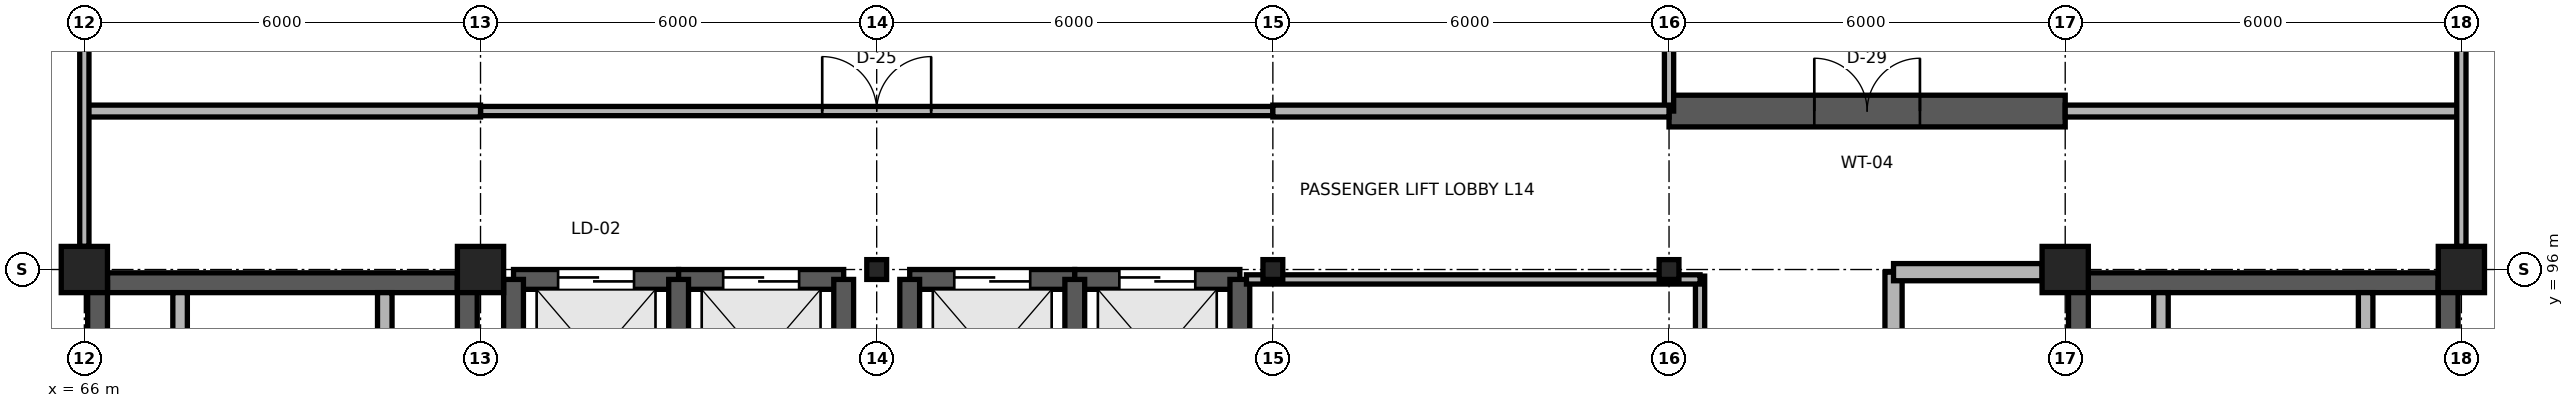
"""IFC4 building model, lengths in metres.
Left out: names, types, materials, properties, quantities, classifications, styles, units other than length and angle.
Written with IfcOpenShell. Run it as: python <this file> out.ifc"""

import sys

from ifc_helpers import new_model, si_unit, direction, frame, frame_2d, origin, origin_2d, place, context, subcontext, project, spatial, rectangle, i_section, extrude, element, fill, save


model = new_model("IFC4")
c1 = context("Model", 3, precision=1e-05, world=origin(), true_north=direction((0.0, 1.0)))
c2 = subcontext(c1, "Body", "Model", "MODEL_VIEW")
j1 = project(units=[si_unit("LENGTHUNIT", "METRE"), si_unit("PLANEANGLEUNIT", "RADIAN")], contexts=[c1])
p1 = place(None, origin())
s1 = spatial("IfcSite", under=j1, at=p1, CompositionType="ELEMENT")
p2 = place(p1, origin())
s2 = spatial("IfcBuilding", under=s1, at=p2, CompositionType="ELEMENT")
p3 = place(p2, frame((0.0, 0.0, 56.1)))
s3 = spatial("IfcBuildingStorey", under=s2, at=p3, CompositionType="ELEMENT", Elevation=56.1)
for number, where, z_axis, x_axis in (
    (1, (66.0, 96.0, 0.0), (0.0, 0.0, 1.0), (1.0, 0.0, 0.0)),
    (2, (72.0, 96.0, 0.0), (0.0, 0.0, 1.0), (1.0, 0.0, 0.0)),
):
    element("IfcColumn", number, at=place(p3, frame(where, z_axis=z_axis, x_axis=x_axis)), inside=s3, PredefinedType="COLUMN", context=c2, shape_type="SweptSolid", body=[
        extrude(rectangle(XDim=0.7, YDim=0.7, at=origin_2d()), origin(), (0.0, 0.0, 1.0), 3.9),
    ])
for number, where, z_axis, x_axis in (
    (3, (78.0, 96.0, 0.0), (0.0, 0.0, 1.0), (1.0, 0.0, 0.0)),
    (4, (84.0, 96.0, 0.0), (0.0, 0.0, 1.0), (1.0, 0.0, 0.0)),
    (5, (90.0, 96.0, 0.0), (0.0, 0.0, 1.0), (1.0, 0.0, 0.0)),
):
    element("IfcColumn", number, at=place(p3, frame(where, z_axis=z_axis, x_axis=x_axis)), inside=s3, PredefinedType="COLUMN", context=c2, shape_type="SweptSolid", body=[
        extrude(i_section(OverallWidth=0.3, OverallDepth=0.3, WebThickness=0.01, FlangeThickness=0.015, FilletRadius=0.018, at=origin_2d()), origin(), (0.0, 0.0, 1.0), 3.9),
    ])
for number, where, z_axis, x_axis in (
    (6, (96.0, 96.0, 0.0), (0.0, 0.0, 1.0), (1.0, 0.0, 0.0)),
    (7, (102.0, 96.0, 0.0), (0.0, 0.0, 1.0), (1.0, 0.0, 0.0)),
):
    element("IfcColumn", number, at=place(p3, frame(where, z_axis=z_axis, x_axis=x_axis)), inside=s3, PredefinedType="COLUMN", context=c2, shape_type="SweptSolid", body=[
        extrude(rectangle(XDim=0.7, YDim=0.7, at=origin_2d()), origin(), (0.0, 0.0, 1.0), 3.9),
    ])
p4 = place(p3, frame((66.35, 95.8, 0.0), z_axis=(0.0, 0.0, 1.0), x_axis=(1.0, 0.0, 0.0)))
e8 = element("IfcWall", 8, at=p4, inside=s3, PredefinedType="SHEAR", context=c2, shape_type="SweptSolid", body=[
    extrude(rectangle(XDim=5.3, YDim=0.3, at=frame_2d((2.65, 0.0))), origin(), (0.0, 0.0, 1.0), 3.74),
])
for number, where, z_axis, x_axis in (
    (9, (66.2, 84.0, 0.0), (0.0, 0.0, 1.0), (0.0, 1.0, 0.0)),
    (10, (71.8, 84.0, 0.0), (0.0, 0.0, 1.0), (0.0, 1.0, 0.0)),
):
    element("IfcWall", number, at=place(p3, frame(where, z_axis=z_axis, x_axis=x_axis)), inside=s3, PredefinedType="SHEAR", context=c2, shape_type="SweptSolid", body=[
        extrude(rectangle(XDim=11.8, YDim=0.3, at=frame_2d((5.9, 0.0))), origin(), (0.0, 0.0, 1.0), 3.74),
    ])
for number, where, z_axis, x_axis in (
    (11, (67.45, 94.4, 0.0), (0.0, 0.0, 1.0), (0.0, 1.0, 0.0)),
    (12, (70.55, 94.4, 0.0), (0.0, 0.0, 1.0), (0.0, 1.0, 0.0)),
):
    element("IfcWall", number, at=place(p3, frame(where, z_axis=z_axis, x_axis=x_axis)), inside=s3, PredefinedType="PARTITIONING", context=c2, shape_type="SweptSolid", body=[
        extrude(rectangle(XDim=1.25, YDim=0.22, at=frame_2d((0.625, 0.0))), origin(), (0.0, 0.0, 1.0), 3.74),
    ])
p5 = place(p3, frame((96.35, 95.8, 0.0), z_axis=(0.0, 0.0, 1.0), x_axis=(1.0, 0.0, 0.0)))
e13 = element("IfcWall", 13, at=p5, inside=s3, PredefinedType="SHEAR", context=c2, shape_type="SweptSolid", body=[
    extrude(rectangle(XDim=5.3, YDim=0.3, at=frame_2d((2.65, 0.0))), origin(), (0.0, 0.0, 1.0), 3.74),
])
for number, where, z_axis, x_axis in (
    (14, (96.2, 84.0, 0.0), (0.0, 0.0, 1.0), (0.0, 1.0, 0.0)),
    (15, (101.8, 84.0, 0.0), (0.0, 0.0, 1.0), (0.0, 1.0, 0.0)),
):
    element("IfcWall", number, at=place(p3, frame(where, z_axis=z_axis, x_axis=x_axis)), inside=s3, PredefinedType="SHEAR", context=c2, shape_type="SweptSolid", body=[
        extrude(rectangle(XDim=11.8, YDim=0.3, at=frame_2d((5.9, 0.0))), origin(), (0.0, 0.0, 1.0), 3.74),
    ])
for number, where, z_axis, x_axis in (
    (16, (97.45, 94.4, 0.0), (0.0, 0.0, 1.0), (0.0, 1.0, 0.0)),
    (17, (100.55, 94.4, 0.0), (0.0, 0.0, 1.0), (0.0, 1.0, 0.0)),
):
    element("IfcWall", number, at=place(p3, frame(where, z_axis=z_axis, x_axis=x_axis)), inside=s3, PredefinedType="PARTITIONING", context=c2, shape_type="SweptSolid", body=[
        extrude(rectangle(XDim=1.25, YDim=0.22, at=frame_2d((0.625, 0.0))), origin(), (0.0, 0.0, 1.0), 3.74),
    ])
p6 = place(p3, frame((72.5, 95.85, 0.0), z_axis=(0.0, 0.0, 1.0), x_axis=(1.0, 0.0, 0.0)))
e18 = element("IfcWall", 18, at=p6, inside=s3, PredefinedType="SHEAR", context=c2, shape_type="SweptSolid", body=[
    extrude(rectangle(XDim=2.5, YDim=0.3, at=frame_2d((1.25, 0.0))), origin(), (0.0, 0.0, 1.0), 3.74),
])
p7 = place(p6, frame((0.675, 0.0, 0.0)))
e19 = element("IfcOpeningElement", 19, at=p7, cuts=e18, PredefinedType="OPENING", context=c2, shape_type="SweptSolid", body=[
    extrude(rectangle(XDim=1.15, YDim=2.15, at=frame_2d((0.575, 1.075))), frame((0.0, 0.165, 0.0), z_axis=(0.0, -1.0, 0.0), x_axis=(1.0, 0.0, 0.0)), (0.0, 0.0, 1.0), 0.33),
])
p8 = place(p3, frame((72.5, 92.45, 0.0), z_axis=(0.0, 0.0, 1.0), x_axis=(0.0, 1.0, 0.0)))
e20 = element("IfcWall", 20, at=p8, inside=s3, PredefinedType="SHEAR", context=c2, shape_type="SweptSolid", body=[
    extrude(rectangle(XDim=3.4, YDim=0.3, at=frame_2d((1.7, 0.0))), origin(), (0.0, 0.0, 1.0), 3.74),
])
p9 = place(p3, frame((75.0, 95.85, 0.0), z_axis=(0.0, 0.0, 1.0), x_axis=(1.0, 0.0, 0.0)))
e21 = element("IfcWall", 21, at=p9, inside=s3, PredefinedType="SHEAR", context=c2, shape_type="SweptSolid", body=[
    extrude(rectangle(XDim=2.5, YDim=0.3, at=frame_2d((1.25, 0.0))), origin(), (0.0, 0.0, 1.0), 3.74),
])
p10 = place(p9, frame((0.675, 0.0, 0.0)))
e22 = element("IfcOpeningElement", 22, at=p10, cuts=e21, PredefinedType="OPENING", context=c2, shape_type="SweptSolid", body=[
    extrude(rectangle(XDim=1.15, YDim=2.15, at=frame_2d((0.575, 1.075))), frame((0.0, 0.165, 0.0), z_axis=(0.0, -1.0, 0.0), x_axis=(1.0, 0.0, 0.0)), (0.0, 0.0, 1.0), 0.33),
])
for number, where, z_axis, x_axis in (
    (23, (75.0, 92.45, 0.0), (0.0, 0.0, 1.0), (0.0, 1.0, 0.0)),
    (24, (77.5, 92.45, 0.0), (0.0, 0.0, 1.0), (0.0, 1.0, 0.0)),
):
    element("IfcWall", number, at=place(p3, frame(where, z_axis=z_axis, x_axis=x_axis)), inside=s3, PredefinedType="SHEAR", context=c2, shape_type="SweptSolid", body=[
        extrude(rectangle(XDim=3.4, YDim=0.3, at=frame_2d((1.7, 0.0))), origin(), (0.0, 0.0, 1.0), 3.74),
    ])
p11 = place(p3, frame((78.5, 95.85, 0.0), z_axis=(0.0, 0.0, 1.0), x_axis=(1.0, 0.0, 0.0)))
e25 = element("IfcWall", 25, at=p11, inside=s3, PredefinedType="SHEAR", context=c2, shape_type="SweptSolid", body=[
    extrude(rectangle(XDim=2.5, YDim=0.3, at=frame_2d((1.25, 0.0))), origin(), (0.0, 0.0, 1.0), 3.74),
])
p12 = place(p11, frame((0.675, 0.0, 0.0)))
e26 = element("IfcOpeningElement", 26, at=p12, cuts=e25, PredefinedType="OPENING", context=c2, shape_type="SweptSolid", body=[
    extrude(rectangle(XDim=1.15, YDim=2.15, at=frame_2d((0.575, 1.075))), frame((0.0, 0.165, 0.0), z_axis=(0.0, -1.0, 0.0), x_axis=(1.0, 0.0, 0.0)), (0.0, 0.0, 1.0), 0.33),
])
p13 = place(p3, frame((78.5, 92.45, 0.0), z_axis=(0.0, 0.0, 1.0), x_axis=(0.0, 1.0, 0.0)))
e27 = element("IfcWall", 27, at=p13, inside=s3, PredefinedType="SHEAR", context=c2, shape_type="SweptSolid", body=[
    extrude(rectangle(XDim=3.4, YDim=0.3, at=frame_2d((1.7, 0.0))), origin(), (0.0, 0.0, 1.0), 3.74),
])
p14 = place(p3, frame((81.0, 95.85, 0.0), z_axis=(0.0, 0.0, 1.0), x_axis=(1.0, 0.0, 0.0)))
e28 = element("IfcWall", 28, at=p14, inside=s3, PredefinedType="SHEAR", context=c2, shape_type="SweptSolid", body=[
    extrude(rectangle(XDim=2.5, YDim=0.3, at=frame_2d((1.25, 0.0))), origin(), (0.0, 0.0, 1.0), 3.74),
])
p15 = place(p14, frame((0.675, 0.0, 0.0)))
e29 = element("IfcOpeningElement", 29, at=p15, cuts=e28, PredefinedType="OPENING", context=c2, shape_type="SweptSolid", body=[
    extrude(rectangle(XDim=1.15, YDim=2.15, at=frame_2d((0.575, 1.075))), frame((0.0, 0.165, 0.0), z_axis=(0.0, -1.0, 0.0), x_axis=(1.0, 0.0, 0.0)), (0.0, 0.0, 1.0), 0.33),
])
for number, where, z_axis, x_axis in (
    (30, (81.0, 92.45, 0.0), (0.0, 0.0, 1.0), (0.0, 1.0, 0.0)),
    (31, (83.5, 92.45, 0.0), (0.0, 0.0, 1.0), (0.0, 1.0, 0.0)),
):
    element("IfcWall", number, at=place(p3, frame(where, z_axis=z_axis, x_axis=x_axis)), inside=s3, PredefinedType="SHEAR", context=c2, shape_type="SweptSolid", body=[
        extrude(rectangle(XDim=3.4, YDim=0.3, at=frame_2d((1.7, 0.0))), origin(), (0.0, 0.0, 1.0), 3.74),
    ])
p16 = place(p3, frame((93.4, 84.0, 0.0), z_axis=(0.0, 0.0, 1.0), x_axis=(0.0, 1.0, 0.0)))
e32 = element("IfcWall", 32, at=p16, inside=s3, PredefinedType="PARTITIONING", context=c2, shape_type="SweptSolid", body=[
    extrude(rectangle(XDim=11.96, YDim=0.26, at=frame_2d((5.98, 0.0))), origin(), (0.0, 0.0, 1.0), 3.74),
])
p17 = place(p16, frame((3.425, 0.0, 0.0)))
e33 = element("IfcOpeningElement", 33, at=p17, cuts=e32, PredefinedType="OPENING", context=c2, shape_type="SweptSolid", body=[
    extrude(rectangle(XDim=1.15, YDim=2.2, at=frame_2d((0.575, 1.1))), frame((0.0, 0.145, 0.0), z_axis=(0.0, -1.0, 0.0), x_axis=(1.0, 0.0, 0.0)), (0.0, 0.0, 1.0), 0.29),
])
p18 = place(p3, frame((93.4, 95.96, 0.0), z_axis=(0.0, 0.0, 1.0), x_axis=(1.0, 0.0, 0.0)))
e34 = element("IfcWall", 34, at=p18, inside=s3, PredefinedType="PARTITIONING", context=c2, shape_type="SweptSolid", body=[
    extrude(rectangle(XDim=2.25, YDim=0.26, at=frame_2d((1.125, 0.0))), origin(), (0.0, 0.0, 1.0), 3.449),
])
p19 = place(p3, frame((72.0, 98.4, 0.0), z_axis=(0.0, 0.0, 1.0), x_axis=(1.0, 0.0, 0.0)))
e35 = element("IfcWall", 35, at=p19, inside=s3, PredefinedType="PARTITIONING", context=c2, shape_type="SweptSolid", body=[
    extrude(rectangle(XDim=12.0, YDim=0.14, at=frame_2d((6.0, 0.0))), origin(), (0.0, 0.0, 1.0), 3.74),
])
p20 = place(p19, frame((5.175, 0.0, 0.0)))
e36 = element("IfcOpeningElement", 36, at=p20, cuts=e35, PredefinedType="OPENING", context=c2, shape_type="SweptSolid", body=[
    extrude(rectangle(XDim=1.65, YDim=2.35, at=frame_2d((0.825, 1.175))), frame((0.0, 0.085, 0.0), z_axis=(0.0, -1.0, 0.0), x_axis=(1.0, 0.0, 0.0)), (0.0, 0.0, 1.0), 0.17),
])
p21 = place(p3, frame((90.0, 98.4, 0.0), z_axis=(0.0, 0.0, 1.0), x_axis=(1.0, 0.0, 0.0)))
e37 = element("IfcWall", 37, at=p21, inside=s3, PredefinedType="SHEAR", context=c2, shape_type="SweptSolid", body=[
    extrude(rectangle(XDim=6.0, YDim=0.48, at=frame_2d((3.0, 0.0))), origin(), (0.0, 0.0, 1.0), 3.74),
])
p22 = place(p21, frame((2.2, 0.0, 0.0)))
e38 = element("IfcOpeningElement", 38, at=p22, cuts=e37, PredefinedType="OPENING", context=c2, shape_type="SweptSolid", body=[
    extrude(rectangle(XDim=1.6, YDim=2.25, at=frame_2d((0.8, 1.125))), frame((0.0, 0.255, 0.0), z_axis=(0.0, -1.0, 0.0), x_axis=(1.0, 0.0, 0.0)), (0.0, 0.0, 1.0), 0.51),
])
p23 = place(p3, frame((90.47, 92.5, 0.0), z_axis=(0.0, 0.0, 1.0), x_axis=(0.0, 1.0, 0.0)))
e39 = element("IfcWall", 39, at=p23, inside=s3, PredefinedType="PARTITIONING", context=c2, shape_type="SweptSolid", body=[
    extrude(rectangle(XDim=3.4, YDim=0.14, at=frame_2d((1.7, 0.0))), origin(), (0.0, 0.0, 1.0), 3.74),
])
p24 = place(p23, frame((1.24, 0.0, 0.0)))
e40 = element("IfcOpeningElement", 40, at=p24, cuts=e39, PredefinedType="OPENING", context=c2, shape_type="SweptSolid", body=[
    extrude(rectangle(XDim=0.92, YDim=2.15, at=frame_2d((0.46, 1.075))), frame((0.0, 0.085, 0.0), z_axis=(0.0, -1.0, 0.0), x_axis=(1.0, 0.0, 0.0)), (0.0, 0.0, 1.0), 0.17),
])
p25 = place(p3, frame((90.0, 98.4, 0.0), z_axis=(0.0, 0.0, 1.0), x_axis=(0.0, 1.0, 0.0)))
e41 = element("IfcWall", 41, at=p25, inside=s3, PredefinedType="PARTITIONING", context=c2, shape_type="SweptSolid", body=[
    extrude(rectangle(XDim=3.15, YDim=0.14, at=frame_2d((1.575, 0.0))), origin(), (0.0, 0.0, 1.0), 3.449),
])
p26 = place(p3, frame((83.6, 95.85, 0.0), z_axis=(0.0, 0.0, 1.0), x_axis=(1.0, 0.0, 0.0)))
e42 = element("IfcWall", 42, at=p26, inside=s3, PredefinedType="PARTITIONING", context=c2, shape_type="SweptSolid", body=[
    extrude(rectangle(XDim=6.87, YDim=0.14, at=frame_2d((3.435, 0.0))), origin(), (0.0, 0.0, 1.0), 3.74),
])
for number, where, z_axis, x_axis in (
    (43, (66.0, 98.4, 0.0), (0.0, 0.0, 1.0), (1.0, 0.0, 0.0)),
    (44, (84.0, 98.4, 0.0), (0.0, 0.0, 1.0), (1.0, 0.0, 0.0)),
    (45, (96.0, 98.4, 0.0), (0.0, 0.0, 1.0), (1.0, 0.0, 0.0)),
):
    element("IfcWall", number, at=place(p3, frame(where, z_axis=z_axis, x_axis=x_axis)), inside=s3, PredefinedType="PARTITIONING", context=c2, shape_type="SweptSolid", body=[
        extrude(rectangle(XDim=6.0, YDim=0.18, at=frame_2d((3.0, 0.0))), origin(), (0.0, 0.0, 1.0), 3.74),
    ])
for number, where, z_axis, x_axis in (
    (46, (66.0, 96.35, 0.0), (0.0, 0.0, 1.0), (0.0, 1.0, 0.0)),
    (47, (102.0, 96.35, 0.0), (0.0, 0.0, 1.0), (0.0, 1.0, 0.0)),
):
    element("IfcWall", number, at=place(p3, frame(where, z_axis=z_axis, x_axis=x_axis)), inside=s3, PredefinedType="PARTITIONING", context=c2, shape_type="SweptSolid", body=[
        extrude(rectangle(XDim=5.3, YDim=0.14, at=frame_2d((2.65, 0.0))), origin(), (0.0, 0.0, 1.0), 3.449),
    ])
p27 = place(p7, origin())
e48 = element("IfcDoor", 48, at=p27, inside=s3, OperationType="DOUBLE_DOOR_SLIDING", PredefinedType="DOOR", context=c2, shape_type="SweptSolid", body=[
    extrude(rectangle(XDim=1.15, YDim=2.15, at=frame_2d((0.575, 1.075))), frame((0.0, 0.025, 0.0), z_axis=(0.0, -1.0, 0.0), x_axis=(1.0, 0.0, 0.0)), (0.0, 0.0, 1.0), 0.05),
])
fill(e19, e48)
p28 = place(p10, origin())
e49 = element("IfcDoor", 49, at=p28, inside=s3, OperationType="DOUBLE_DOOR_SLIDING", PredefinedType="DOOR", context=c2, shape_type="SweptSolid", body=[
    extrude(rectangle(XDim=1.15, YDim=2.15, at=frame_2d((0.575, 1.075))), frame((0.0, 0.025, 0.0), z_axis=(0.0, -1.0, 0.0), x_axis=(1.0, 0.0, 0.0)), (0.0, 0.0, 1.0), 0.05),
])
fill(e22, e49)
p29 = place(p12, origin())
e50 = element("IfcDoor", 50, at=p29, inside=s3, OperationType="DOUBLE_DOOR_SLIDING", PredefinedType="DOOR", context=c2, shape_type="SweptSolid", body=[
    extrude(rectangle(XDim=1.15, YDim=2.15, at=frame_2d((0.575, 1.075))), frame((0.0, 0.025, 0.0), z_axis=(0.0, -1.0, 0.0), x_axis=(1.0, 0.0, 0.0)), (0.0, 0.0, 1.0), 0.05),
])
fill(e26, e50)
p30 = place(p15, origin())
e51 = element("IfcDoor", 51, at=p30, inside=s3, OperationType="DOUBLE_DOOR_SLIDING", PredefinedType="DOOR", context=c2, shape_type="SweptSolid", body=[
    extrude(rectangle(XDim=1.15, YDim=2.15, at=frame_2d((0.575, 1.075))), frame((0.0, 0.025, 0.0), z_axis=(0.0, -1.0, 0.0), x_axis=(1.0, 0.0, 0.0)), (0.0, 0.0, 1.0), 0.05),
])
fill(e29, e51)
p31 = place(p20, origin())
e52 = element("IfcDoor", 52, at=p31, inside=s3, OperationType="DOUBLE_DOOR_SINGLE_SWING", PredefinedType="DOOR", context=c2, shape_type="SweptSolid", body=[
    extrude(rectangle(XDim=1.65, YDim=2.35, at=frame_2d((0.825, 1.175))), frame((0.0, 0.025, 0.0), z_axis=(0.0, -1.0, 0.0), x_axis=(1.0, 0.0, 0.0)), (0.0, 0.0, 1.0), 0.05),
])
fill(e36, e52)
p32 = place(p22, origin())
e53 = element("IfcDoor", 53, at=p32, inside=s3, OperationType="DOUBLE_DOOR_SINGLE_SWING", PredefinedType="DOOR", context=c2, shape_type="SweptSolid", body=[
    extrude(rectangle(XDim=1.6, YDim=2.25, at=frame_2d((0.8, 1.125))), frame((0.0, 0.025, 0.0), z_axis=(0.0, -1.0, 0.0), x_axis=(1.0, 0.0, 0.0)), (0.0, 0.0, 1.0), 0.05),
])
fill(e38, e53)
save(model, sys.argv[1])
